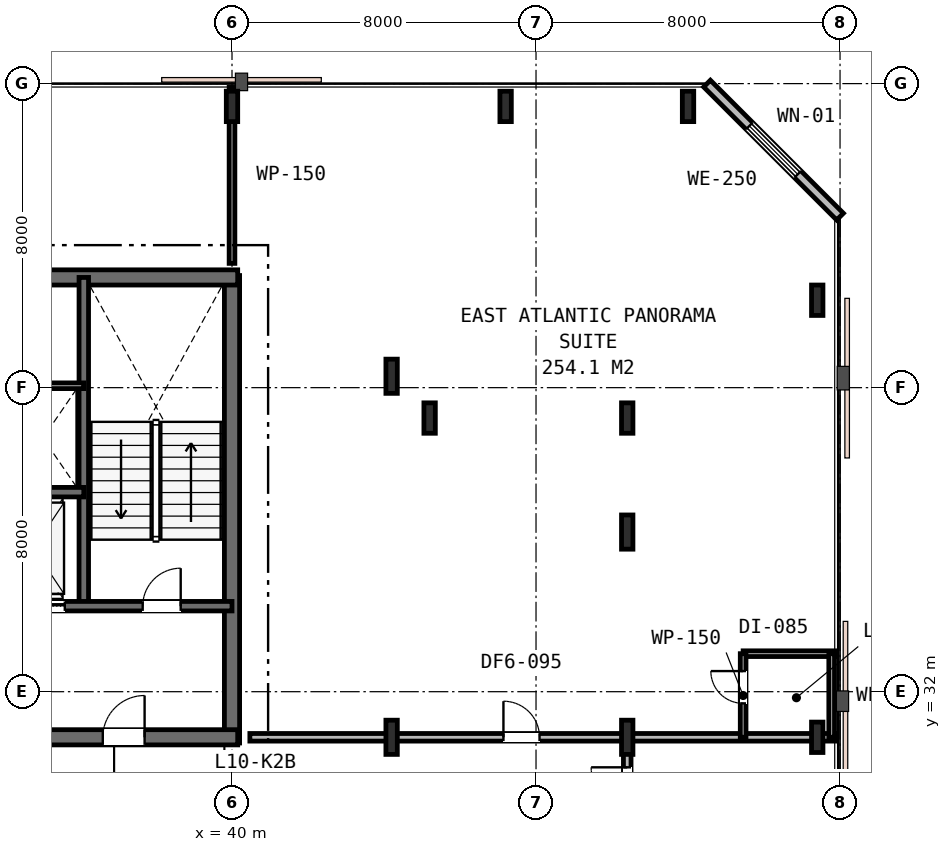
"""IFC4 building model, lengths in metres.
Left out: names, types, materials, properties, quantities, classifications, styles, units other than length and angle.
Written with IfcOpenShell. Run it as: python <this file> out.ifc"""

import sys

from ifc_helpers import new_model, si_unit, direction, frame, frame_2d, origin, origin_2d, place, context, subcontext, project, spatial, rectangle, i_section, extrude, element, fill, save


model = new_model("IFC4")
c1 = context("Model", 3, precision=1e-05, world=origin(), true_north=direction((0.0, 1.0)))
c2 = subcontext(c1, "Body", "Model", "MODEL_VIEW")
j1 = project(units=[si_unit("LENGTHUNIT", "METRE"), si_unit("PLANEANGLEUNIT", "RADIAN")], contexts=[c1])
p1 = place(None, origin())
s1 = spatial("IfcSite", under=j1, at=p1, CompositionType="ELEMENT")
p2 = place(p1, origin())
s2 = spatial("IfcBuilding", under=s1, at=p2, CompositionType="ELEMENT")
p3 = place(p2, frame((0.0, 0.0, 43.8)))
s3 = spatial("IfcBuildingStorey", under=s2, at=p3, CompositionType="ELEMENT", Elevation=43.8)
p4 = place(p3, frame((40.0, 30.65, 0.0), z_axis=(0.0, 0.0, 1.0), x_axis=(0.0, 1.0, 0.0)))
e1 = element("IfcWall", 1, at=p4, inside=s3, PredefinedType="SHEAR", context=c2, shape_type="SweptSolid", body=[
    extrude(rectangle(XDim=12.3, YDim=0.4, at=frame_2d((6.15, 0.0))), origin(), (0.0, 0.0, 1.0), 3.6),
])
p5 = place(p3, frame((15.85, 42.9, 0.0), z_axis=(0.0, 0.0, 1.0), x_axis=(1.0, 0.0, 0.0)))
e2 = element("IfcWall", 2, at=p5, inside=s3, PredefinedType="SHEAR", context=c2, shape_type="SweptSolid", body=[
    extrude(rectangle(XDim=24.3, YDim=0.4, at=frame_2d((12.15, 0.0))), origin(), (0.0, 0.0, 1.0), 3.6),
])
p6 = place(p3, frame((28.95, 30.8, 0.0), z_axis=(0.0, 0.0, 1.0), x_axis=(1.0, 0.0, 0.0)))
e3 = element("IfcWall", 3, at=p6, inside=s3, PredefinedType="SHEAR", context=c2, shape_type="SweptSolid", body=[
    extrude(rectangle(XDim=11.2, YDim=0.4, at=frame_2d((5.6, 0.0))), origin(), (0.0, 0.0, 1.0), 3.6),
])
p7 = place(p6, frame((7.65, 0.0, 0.0)))
e4 = element("IfcOpeningElement", 4, at=p7, cuts=e3, PredefinedType="OPENING", context=c2, shape_type="SweptSolid", body=[
    extrude(rectangle(XDim=1.1, YDim=2.15, at=frame_2d((0.55, 1.075))), frame((0.0, 0.21, 0.0), z_axis=(0.0, -1.0, 0.0), x_axis=(1.0, 0.0, 0.0)), (0.0, 0.0, 1.0), 0.42),
])
p8 = place(p3, frame((36.1, 34.25, 0.0), z_axis=(0.0, 0.0, 1.0), x_axis=(0.0, 1.0, 0.0)))
e5 = element("IfcWall", 5, at=p8, inside=s3, PredefinedType="SHEAR", context=c2, shape_type="SweptSolid", body=[
    extrude(rectangle(XDim=8.65, YDim=0.25, at=frame_2d((4.325, 0.0))), origin(), (0.0, 0.0, 1.0), 3.6),
])
p9 = place(p3, frame((33.95, 34.25, 0.0), z_axis=(0.0, 0.0, 1.0), x_axis=(1.0, 0.0, 0.0)))
e6 = element("IfcWall", 6, at=p9, inside=s3, PredefinedType="SHEAR", context=c2, shape_type="SweptSolid", body=[
    extrude(rectangle(XDim=6.05, YDim=0.25, at=frame_2d((3.025, 0.0))), origin(), (0.0, 0.0, 1.0), 3.6),
])
p10 = place(p9, frame((3.7, 0.0, 0.0)))
e7 = element("IfcOpeningElement", 7, at=p10, cuts=e6, PredefinedType="OPENING", context=c2, shape_type="SweptSolid", body=[
    extrude(rectangle(XDim=1.0, YDim=2.15, at=frame_2d((0.5, 1.075))), frame((0.0, 0.135, 0.0), z_axis=(0.0, -1.0, 0.0), x_axis=(1.0, 0.0, 0.0)), (0.0, 0.0, 1.0), 0.27),
])
p11 = place(p9, frame((0.55, 0.0, 0.0)))
e8 = element("IfcOpeningElement", 8, at=p11, cuts=e6, PredefinedType="OPENING", context=c2, shape_type="SweptSolid", body=[
    extrude(rectangle(XDim=1.1, YDim=2.15, at=frame_2d((0.55, 1.075))), frame((0.0, 0.135, 0.0), z_axis=(0.0, -1.0, 0.0), x_axis=(1.0, 0.0, 0.0)), (0.0, 0.0, 1.0), 0.27),
])
p12 = place(p3, frame((19.9, 37.25, 0.0), z_axis=(0.0, 0.0, 1.0), x_axis=(1.0, 0.0, 0.0)))
e9 = element("IfcWall", 9, at=p12, inside=s3, PredefinedType="SHEAR", context=c2, shape_type="SweptSolid", body=[
    extrude(rectangle(XDim=16.2, YDim=0.25, at=frame_2d((8.1, 0.0))), origin(), (0.0, 0.0, 1.0), 3.6),
])
p13 = place(p12, frame((12.55, 0.0, 0.0)))
e10 = element("IfcOpeningElement", 10, at=p13, cuts=e9, PredefinedType="OPENING", context=c2, shape_type="SweptSolid", body=[
    extrude(rectangle(XDim=0.9, YDim=2.15, at=frame_2d((0.45, 1.075))), frame((0.0, 0.135, 0.0), z_axis=(0.0, -1.0, 0.0), x_axis=(1.0, 0.0, 0.0)), (0.0, 0.0, 1.0), 0.27),
])
for number, where, z_axis, x_axis in (
    (11, (45.2, 39.2, 0.0), (0.0, 0.0, 1.0), (1.0, 0.0, 0.0)),
    (12, (40.0, 47.4, 0.0), (0.0, 0.0, 1.0), (1.0, 0.0, 0.0)),
    (13, (47.2, 47.4, 0.0), (0.0, 0.0, 1.0), (1.0, 0.0, 0.0)),
    (14, (50.4, 39.2, 0.0), (0.0, 0.0, 1.0), (1.0, 0.0, 0.0)),
    (15, (55.4, 30.8, 0.0), (0.0, 0.0, 1.0), (1.0, 0.0, 0.0)),
    (16, (55.4, 42.3, 0.0), (0.0, 0.0, 1.0), (1.0, 0.0, 0.0)),
    (17, (52.0, 47.4, 0.0), (0.0, 0.0, 1.0), (1.0, 0.0, 0.0)),
):
    element("IfcColumn", number, at=place(p3, frame(where, z_axis=z_axis, x_axis=x_axis)), inside=s3, PredefinedType="COLUMN", context=c2, shape_type="SweptSolid", body=[
        extrude(i_section(OverallWidth=0.3, OverallDepth=0.8, WebThickness=0.018, FlangeThickness=0.033, FilletRadius=0.03, at=origin_2d()), origin(), (0.0, 0.0, 1.0), 3.6),
    ])
for number, where, z_axis, x_axis in (
    (18, (44.2, 30.8, 0.0), (0.0, 0.0, 1.0), (1.0, 0.0, 0.0)),
    (19, (44.2, 40.3, 0.0), (0.0, 0.0, 1.0), (1.0, 0.0, 0.0)),
    (20, (50.4, 30.8, 0.0), (0.0, 0.0, 1.0), (1.0, 0.0, 0.0)),
    (21, (50.4, 36.2, 0.0), (0.0, 0.0, 1.0), (1.0, 0.0, 0.0)),
):
    element("IfcColumn", number, at=place(p3, frame(where, z_axis=z_axis, x_axis=x_axis)), inside=s3, PredefinedType="COLUMN", context=c2, shape_type="SweptSolid", body=[
        extrude(i_section(OverallWidth=0.3, OverallDepth=0.9, WebThickness=0.018, FlangeThickness=0.035, FilletRadius=0.03, at=origin_2d()), origin(), (0.0, 0.0, 1.0), 3.6),
    ])
p14 = place(p3, frame((56.0, 44.5, 0.0), z_axis=(0.0, 0.0, 1.0), x_axis=(-0.707106781187, 0.707106781187, 0.0)))
e22 = element("IfcWall", 22, at=p14, inside=s3, PredefinedType="STANDARD", context=c2, shape_type="SweptSolid", body=[
    extrude(rectangle(XDim=4.95, YDim=0.25, at=frame_2d((2.475, 0.0))), origin(), (0.0, 0.0, 1.0), 3.33),
])
p15 = place(p14, frame((1.575, 0.0, 0.75)))
e23 = element("IfcOpeningElement", 23, at=p15, cuts=e22, PredefinedType="OPENING", context=c2, shape_type="SweptSolid", body=[
    extrude(rectangle(XDim=1.8, YDim=1.85, at=frame_2d((0.9, 0.925))), frame((0.0, 0.135, 0.0), z_axis=(0.0, -1.0, 0.0), x_axis=(1.0, 0.0, 0.0)), (0.0, 0.0, 1.0), 0.27),
])
p16 = place(p3, frame((34.05, 40.05, 0.0), z_axis=(0.0, 0.0, 1.0), x_axis=(1.0, 0.0, 0.0)))
e24 = element("IfcWall", 24, at=p16, inside=s3, PredefinedType="PARTITIONING", context=c2, shape_type="SweptSolid", body=[
    extrude(rectangle(XDim=2.05, YDim=0.15, at=frame_2d((1.025, 0.0))), origin(), (0.0, 0.0, 1.0), 3.33),
])
p17 = place(p3, frame((40.0, 43.27, 0.0), z_axis=(0.0, 0.0, 1.0), x_axis=(0.0, 1.0, 0.0)))
e25 = element("IfcWall", 25, at=p17, inside=s3, PredefinedType="PARTITIONING", context=c2, shape_type="SweptSolid", body=[
    extrude(rectangle(XDim=4.63, YDim=0.15, at=frame_2d((2.315, 0.0))), origin(), (0.0, 0.0, 1.0), 2.93),
])
p18 = place(p3, frame((40.47, 30.8, 0.0), z_axis=(0.0, 0.0, 1.0), x_axis=(1.0, 0.0, 0.0)))
e26 = element("IfcWall", 26, at=p18, inside=s3, PredefinedType="PARTITIONING", context=c2, shape_type="SweptSolid", body=[
    extrude(rectangle(XDim=15.43, YDim=0.2, at=frame_2d((7.715, 0.0))), origin(), (0.0, 0.0, 1.0), 2.82),
])
p19 = place(p18, frame((6.673, 0.0, 0.0)))
e27 = element("IfcOpeningElement", 27, at=p19, cuts=e26, PredefinedType="OPENING", context=c2, shape_type="SweptSolid", body=[
    extrude(rectangle(XDim=0.95, YDim=2.15, at=frame_2d((0.475, 1.075))), frame((0.0, 0.11, 0.0), z_axis=(0.0, -1.0, 0.0), x_axis=(1.0, 0.0, 0.0)), (0.0, 0.0, 1.0), 0.22),
])
p20 = place(p3, frame((53.45, 33.0, 0.0), z_axis=(0.0, 0.0, 1.0), x_axis=(1.0, 0.0, 0.0)))
e28 = element("IfcWall", 28, at=p20, inside=s3, PredefinedType="PARTITIONING", context=c2, shape_type="SweptSolid", body=[
    extrude(rectangle(XDim=2.45, YDim=0.15, at=frame_2d((1.225, 0.0))), origin(), (0.0, 0.0, 1.0), 2.93),
])
p21 = place(p3, frame((53.45, 30.8, 0.0), z_axis=(0.0, 0.0, 1.0), x_axis=(0.0, 1.0, 0.0)))
e29 = element("IfcWall", 29, at=p21, inside=s3, PredefinedType="PARTITIONING", context=c2, shape_type="SweptSolid", body=[
    extrude(rectangle(XDim=2.2, YDim=0.15, at=frame_2d((1.1, 0.0))), origin(), (0.0, 0.0, 1.0), 2.82),
])
p22 = place(p21, frame((0.892, 0.0, 0.0)))
e30 = element("IfcOpeningElement", 30, at=p22, cuts=e29, PredefinedType="OPENING", context=c2, shape_type="SweptSolid", body=[
    extrude(rectangle(XDim=0.85, YDim=2.15, at=frame_2d((0.425, 1.075))), frame((0.0, 0.085, 0.0), z_axis=(0.0, -1.0, 0.0), x_axis=(1.0, 0.0, 0.0)), (0.0, 0.0, 1.0), 0.17),
])
p23 = place(p3, frame((55.78, 33.0, 0.0), z_axis=(0.0, 0.0, 1.0), x_axis=(0.0, -1.0, 0.0)))
e31 = element("IfcWall", 31, at=p23, inside=s3, PredefinedType="PARTITIONING", context=c2, shape_type="SweptSolid", body=[
    extrude(rectangle(XDim=2.2, YDim=0.15, at=frame_2d((1.1, 0.0))), origin(), (0.0, 0.0, 1.0), 2.82),
])
p24 = place(p3, frame((50.4, 28.6, 0.0), z_axis=(0.0, 0.0, 1.0), x_axis=(0.0, 1.0, 0.0)))
e32 = element("IfcWall", 32, at=p24, inside=s3, PredefinedType="PARTITIONING", context=c2, shape_type="SweptSolid", body=[
    extrude(rectangle(XDim=2.2, YDim=0.2, at=frame_2d((1.1, 0.0))), origin(), (0.0, 0.0, 1.0), 2.82),
])
p25 = place(p24, frame((0.46, 0.0, 0.0)))
e33 = element("IfcOpeningElement", 33, at=p25, cuts=e32, PredefinedType="OPENING", context=c2, shape_type="SweptSolid", body=[
    extrude(rectangle(XDim=0.95, YDim=2.15, at=frame_2d((0.475, 1.075))), frame((0.0, 0.11, 0.0), z_axis=(0.0, -1.0, 0.0), x_axis=(1.0, 0.0, 0.0)), (0.0, 0.0, 1.0), 0.22),
])
p26 = place(p15, origin())
e34 = element("IfcWindow", 34, at=p26, inside=s3, PartitioningType="SINGLE_PANEL", PredefinedType="WINDOW", context=c2, shape_type="SweptSolid", body=[
    extrude(rectangle(XDim=1.8, YDim=1.85, at=frame_2d((0.9, 0.925))), frame((0.0, 0.03, 0.0), z_axis=(0.0, -1.0, 0.0), x_axis=(1.0, 0.0, 0.0)), (0.0, 0.0, 1.0), 0.06),
])
fill(e23, e34)
p27 = place(p10, origin())
e35 = element("IfcDoor", 35, at=p27, inside=s3, OperationType="SINGLE_SWING_RIGHT", PredefinedType="DOOR", context=c2, shape_type="SweptSolid", body=[
    extrude(rectangle(XDim=1.0, YDim=2.15, at=frame_2d((0.5, 1.075))), frame((0.0, 0.025, 0.0), z_axis=(0.0, -1.0, 0.0), x_axis=(1.0, 0.0, 0.0)), (0.0, 0.0, 1.0), 0.05),
])
fill(e7, e35)
p28 = place(p7, origin())
e36 = element("IfcDoor", 36, at=p28, inside=s3, OperationType="SINGLE_SWING_RIGHT", PredefinedType="DOOR", context=c2, shape_type="SweptSolid", body=[
    extrude(rectangle(XDim=1.1, YDim=2.15, at=frame_2d((0.55, 1.075))), frame((0.0, 0.025, 0.0), z_axis=(0.0, -1.0, 0.0), x_axis=(1.0, 0.0, 0.0)), (0.0, 0.0, 1.0), 0.05),
])
fill(e4, e36)
p29 = place(p19, origin())
e37 = element("IfcDoor", 37, at=p29, inside=s3, OperationType="SINGLE_SWING_LEFT", PredefinedType="DOOR", context=c2, shape_type="SweptSolid", body=[
    extrude(rectangle(XDim=0.95, YDim=2.15, at=frame_2d((0.475, 1.075))), frame((0.0, 0.025, 0.0), z_axis=(0.0, -1.0, 0.0), x_axis=(1.0, 0.0, 0.0)), (0.0, 0.0, 1.0), 0.05),
])
fill(e27, e37)
p30 = place(p22, origin())
e38 = element("IfcDoor", 38, at=p30, inside=s3, OperationType="SINGLE_SWING_RIGHT", PredefinedType="DOOR", context=c2, shape_type="SweptSolid", body=[
    extrude(rectangle(XDim=0.85, YDim=2.15, at=frame_2d((0.425, 1.075))), frame((0.0, 0.025, 0.0), z_axis=(0.0, -1.0, 0.0), x_axis=(1.0, 0.0, 0.0)), (0.0, 0.0, 1.0), 0.05),
])
fill(e30, e38)
p31 = place(p25, origin())
e39 = element("IfcDoor", 39, at=p31, inside=s3, OperationType="SINGLE_SWING_RIGHT", PredefinedType="DOOR", context=c2, shape_type="SweptSolid", body=[
    extrude(rectangle(XDim=0.95, YDim=2.15, at=frame_2d((0.475, 1.075))), frame((0.0, 0.025, 0.0), z_axis=(0.0, -1.0, 0.0), x_axis=(1.0, 0.0, 0.0)), (0.0, 0.0, 1.0), 0.05),
])
fill(e33, e39)
p32 = place(p11, origin())
e40 = element("IfcDoor", 40, at=p32, inside=s3, OperationType="DOUBLE_DOOR_SLIDING", PredefinedType="DOOR", context=c2, shape_type="SweptSolid", body=[
    extrude(rectangle(XDim=1.1, YDim=2.15, at=frame_2d((0.55, 1.075))), frame((0.0, 0.025, 0.0), z_axis=(0.0, -1.0, 0.0), x_axis=(1.0, 0.0, 0.0)), (0.0, 0.0, 1.0), 0.05),
])
fill(e8, e40)
save(model, sys.argv[1])
